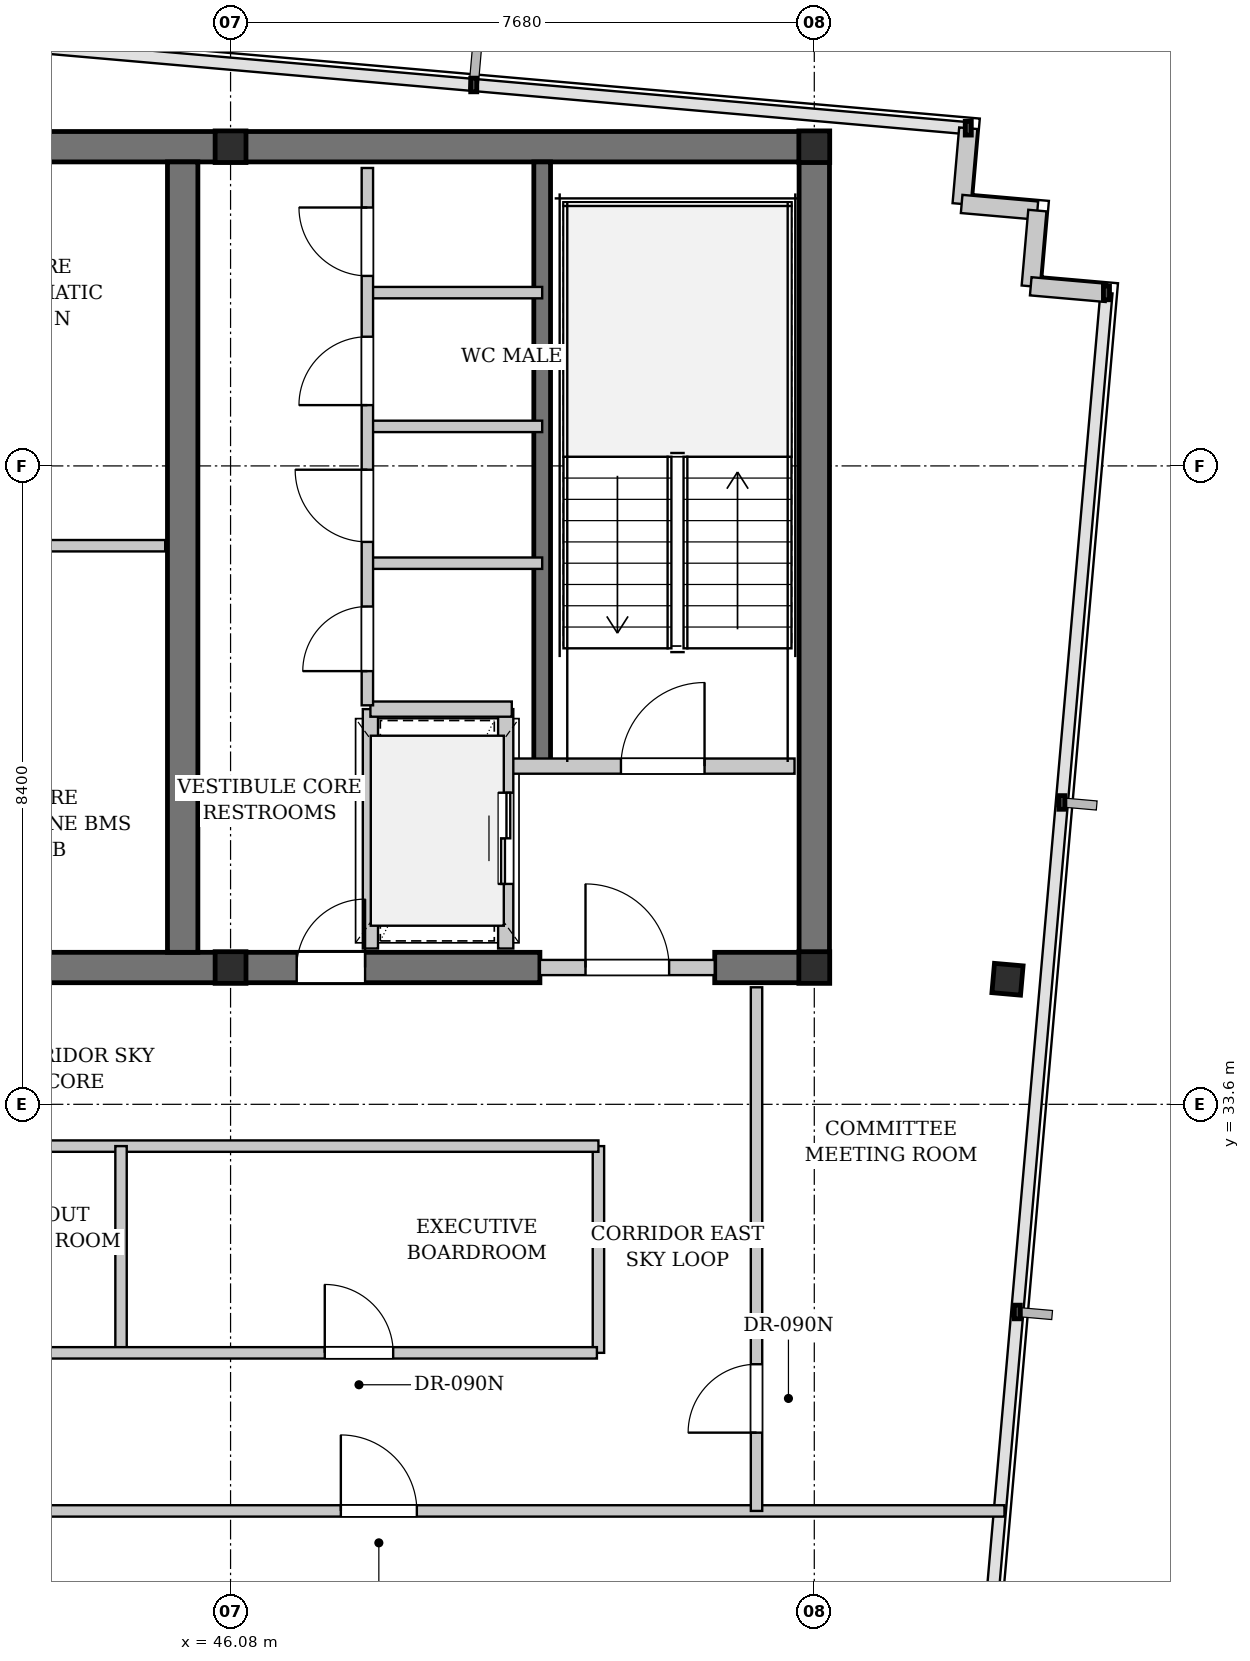
"""IFC4 building model, lengths in metres.
Left out: names, types, materials, properties, quantities, classifications, styles, units other than length and angle.
Written with IfcOpenShell. Run it as: python <this file> out.ifc"""

import sys

from ifc_helpers import new_model, si_unit, direction, frame, frame_2d, origin, origin_2d, place, context, subcontext, project, spatial, rectangle, i_section, extrude, element, fill, save


model = new_model("IFC4")
c1 = context("Model", 3, precision=1e-05, world=origin(), true_north=direction((0.0, 1.0)))
c2 = subcontext(c1, "Body", "Model", "MODEL_VIEW")
j1 = project(units=[si_unit("LENGTHUNIT", "METRE"), si_unit("PLANEANGLEUNIT", "RADIAN")], contexts=[c1])
p1 = place(None, origin())
s1 = spatial("IfcSite", under=j1, at=p1, CompositionType="ELEMENT")
p2 = place(p1, origin())
s2 = spatial("IfcBuilding", under=s1, at=p2, CompositionType="ELEMENT")
p3 = place(p2, frame((0.0, 0.0, 265.9)))
s3 = spatial("IfcBuildingStorey", under=s2, at=p3, CompositionType="ELEMENT", Elevation=265.9)
p4 = place(p3, frame((22.84, 46.2, 0.0), z_axis=(0.0, 0.0, 1.0), x_axis=(1.0, 0.0, 0.0)))
e1 = element("IfcWall", 1, at=p4, inside=s3, PredefinedType="SHEAR", context=c2, shape_type="SweptSolid", body=[
    extrude(rectangle(XDim=31.12, YDim=0.4, at=frame_2d((15.56, 0.0))), origin(), (0.0, 0.0, 1.0), 3.18),
])
p5 = place(p3, frame((42.1, 35.4, 0.0), z_axis=(0.0, 0.0, 1.0), x_axis=(1.0, 0.0, 0.0)))
e2 = element("IfcWall", 2, at=p5, inside=s3, PredefinedType="SHEAR", context=c2, shape_type="SweptSolid", body=[
    extrude(rectangle(XDim=8.05, YDim=0.4, at=frame_2d((4.025, 0.0))), origin(), (0.0, 0.0, 1.0), 3.18),
])
p6 = place(p5, frame((4.85, 0.0, 0.0)))
e3 = element("IfcOpeningElement", 3, at=p6, cuts=e2, PredefinedType="OPENING", context=c2, shape_type="SweptSolid", body=[
    extrude(rectangle(XDim=0.9, YDim=2.15, at=frame_2d((0.45, 1.075))), frame((0.0, 0.21, 0.0), z_axis=(0.0, -1.0, 0.0), x_axis=(1.0, 0.0, 0.0)), (0.0, 0.0, 1.0), 0.42),
])
p7 = place(p3, frame((52.45, 35.4, 0.0), z_axis=(0.0, 0.0, 1.0), x_axis=(1.0, 0.0, 0.0)))
e4 = element("IfcWall", 4, at=p7, inside=s3, PredefinedType="SHEAR", context=c2, shape_type="SweptSolid", body=[
    extrude(rectangle(XDim=1.51, YDim=0.4, at=frame_2d((0.755, 0.0))), origin(), (0.0, 0.0, 1.0), 3.18),
])
for number, where, z_axis, x_axis in (
    (5, (45.45, 35.6, 0.0), (0.0, 0.0, 1.0), (0.0, 1.0, 0.0)),
    (6, (53.76, 35.6, 0.0), (0.0, 0.0, 1.0), (0.0, 1.0, 0.0)),
):
    element("IfcWall", number, at=place(p3, frame(where, z_axis=z_axis, x_axis=x_axis)), inside=s3, PredefinedType="SHEAR", context=c2, shape_type="SweptSolid", body=[
        extrude(rectangle(XDim=10.4, YDim=0.4, at=frame_2d((5.2, 0.0))), origin(), (0.0, 0.0, 1.0), 3.18),
    ])
p8 = place(p3, frame((50.18, 38.05, 0.0), z_axis=(0.0, 0.0, 1.0), x_axis=(0.0, 1.0, 0.0)))
e7 = element("IfcWall", 7, at=p8, inside=s3, PredefinedType="SHEAR", context=c2, shape_type="SweptSolid", body=[
    extrude(rectangle(XDim=7.95, YDim=0.22, at=frame_2d((3.975, 0.0))), origin(), (0.0, 0.0, 1.0), 3.18),
])
for number, where, z_axis, x_axis in (
    (8, (46.08, 35.4, 0.0), (0.0, 0.0, 1.0), (1.0, 0.0, 0.0)),
    (9, (46.08, 46.2, 0.0), (0.0, 0.0, 1.0), (1.0, 0.0, 0.0)),
    (10, (53.76, 35.4, 0.0), (0.0, 0.0, 1.0), (1.0, 0.0, 0.0)),
    (11, (53.76, 46.2, 0.0), (0.0, 0.0, 1.0), (1.0, 0.0, 0.0)),
):
    element("IfcColumn", number, at=place(p3, frame(where, z_axis=z_axis, x_axis=x_axis)), inside=s3, PredefinedType="COLUMN", context=c2, shape_type="SweptSolid", body=[
        extrude(i_section(OverallWidth=0.406, OverallDepth=0.416, WebThickness=0.03, FlangeThickness=0.048, FilletRadius=0.015, at=origin_2d()), origin(), (0.0, 0.0, 1.0), 3.4),
    ])
p9 = place(p3, frame((56.302, 35.246, 0.0), z_axis=(0.0, 0.0, 1.0), x_axis=(0.996194698092, -0.087155742748, 0.0)))
e12 = element("IfcColumn", 12, at=p9, inside=s3, PredefinedType="COLUMN", context=c2, shape_type="SweptSolid", body=[
    extrude(i_section(OverallWidth=0.378, OverallDepth=0.387, WebThickness=0.021, FlangeThickness=0.033, FilletRadius=0.015, at=origin_2d()), origin(), (0.0, 0.0, 1.0), 3.4),
])
for number, where, z_axis, x_axis in (
    (13, (55.786, 46.443, 0.0), (0.0, 0.0, 1.0), (-0.087, -0.996, 0.0)),
    (14, (55.699, 45.447, 0.0), (0.0, 0.0, 1.0), (0.996, -0.087, 0.0)),
    (15, (56.695, 45.36, 0.0), (0.0, 0.0, 1.0), (-0.087, -0.996, 0.0)),
    (16, (56.608, 44.364, 0.0), (0.0, 0.0, 1.0), (0.996, -0.087, 0.0)),
):
    element("IfcWall", number, at=place(p3, frame(where, z_axis=z_axis, x_axis=x_axis)), inside=s3, PredefinedType="SOLIDWALL", context=c2, shape_type="SweptSolid", body=[
        extrude(rectangle(XDim=1.0, YDim=0.24, at=frame_2d((0.5, 0.0))), origin(), (0.0, 0.0, 1.0), 3.18),
    ])
p10 = place(p3, frame((41.85, 40.95, 0.0), z_axis=(0.0, 0.0, 1.0), x_axis=(1.0, 0.0, 0.0)))
e17 = element("IfcWall", 17, at=p10, inside=s3, PredefinedType="PARTITIONING", context=c2, shape_type="SweptSolid", body=[
    extrude(rectangle(XDim=3.37, YDim=0.15, at=frame_2d((1.685, 0.0))), origin(), (0.0, 0.0, 1.0), 3.18),
])
p11 = place(p3, frame((49.78, 38.05, 0.0), z_axis=(0.0, 0.0, 1.0), x_axis=(1.0, 0.0, 0.0)))
e18 = element("IfcWall", 18, at=p11, inside=s3, PredefinedType="PARTITIONING", context=c2, shape_type="SweptSolid", body=[
    extrude(rectangle(XDim=3.72, YDim=0.2, at=frame_2d((1.86, 0.0))), origin(), (0.0, 0.0, 1.0), 3.18),
])
p12 = place(p11, frame((1.436, 0.0, 0.0)))
e19 = element("IfcOpeningElement", 19, at=p12, cuts=e18, PredefinedType="OPENING", context=c2, shape_type="SweptSolid", body=[
    extrude(rectangle(XDim=1.1, YDim=2.15, at=frame_2d((0.55, 1.075))), frame((0.0, 0.11, 0.0), z_axis=(0.0, -1.0, 0.0), x_axis=(1.0, 0.0, 0.0)), (0.0, 0.0, 1.0), 0.22),
])
p13 = place(p3, frame((50.15, 35.4, 0.0), z_axis=(0.0, 0.0, 1.0), x_axis=(1.0, 0.0, 0.0)))
e20 = element("IfcWall", 20, at=p13, inside=s3, PredefinedType="PARTITIONING", context=c2, shape_type="SweptSolid", body=[
    extrude(rectangle(XDim=2.3, YDim=0.2, at=frame_2d((1.15, 0.0))), origin(), (0.0, 0.0, 1.0), 2.575),
])
p14 = place(p13, frame((0.6, 0.0, 0.0)))
e21 = element("IfcOpeningElement", 21, at=p14, cuts=e20, PredefinedType="OPENING", context=c2, shape_type="SweptSolid", body=[
    extrude(rectangle(XDim=1.1, YDim=2.15, at=frame_2d((0.55, 1.075))), frame((0.0, 0.11, 0.0), z_axis=(0.0, -1.0, 0.0), x_axis=(1.0, 0.0, 0.0)), (0.0, 0.0, 1.0), 0.22),
])
p15 = place(p3, frame((49.7, 35.65, 0.0), z_axis=(0.0, 0.0, 1.0), x_axis=(0.0, 1.0, 0.0)))
e22 = element("IfcWall", 22, at=p15, inside=s3, PredefinedType="PARTITIONING", context=c2, shape_type="SweptSolid", body=[
    extrude(rectangle(XDim=3.15, YDim=0.2, at=frame_2d((1.575, 0.0))), origin(), (0.0, 0.0, 1.0), 3.18),
])
p16 = place(p15, frame((0.85, 0.0, 0.0)))
e23 = element("IfcOpeningElement", 23, at=p16, cuts=e22, PredefinedType="OPENING", context=c2, shape_type="SweptSolid", body=[
    extrude(rectangle(XDim=1.2, YDim=2.2, at=frame_2d((0.6, 1.1))), frame((0.0, 0.11, 0.0), z_axis=(0.0, -1.0, 0.0), x_axis=(1.0, 0.0, 0.0)), (0.0, 0.0, 1.0), 0.22),
])
p17 = place(p3, frame((47.92, 35.65, 0.0), z_axis=(0.0, 0.0, 1.0), x_axis=(0.0, 1.0, 0.0)))
e24 = element("IfcWall", 24, at=p17, inside=s3, PredefinedType="PARTITIONING", context=c2, shape_type="SweptSolid", body=[
    extrude(rectangle(XDim=3.15, YDim=0.2, at=frame_2d((1.575, 0.0))), origin(), (0.0, 0.0, 1.0), 3.18),
])
p18 = place(p3, frame((47.92, 38.8, 0.0), z_axis=(0.0, 0.0, 1.0), x_axis=(1.0, 0.0, 0.0)))
e25 = element("IfcWall", 25, at=p18, inside=s3, PredefinedType="PARTITIONING", context=c2, shape_type="SweptSolid", body=[
    extrude(rectangle(XDim=1.86, YDim=0.2, at=frame_2d((0.93, 0.0))), origin(), (0.0, 0.0, 1.0), 3.18),
])
for number, where, z_axis, x_axis in (
    (26, (47.88, 40.72, 0.0), (0.0, 0.0, 1.0), (1.0, 0.0, 0.0)),
    (27, (47.88, 42.52, 0.0), (0.0, 0.0, 1.0), (1.0, 0.0, 0.0)),
    (28, (47.88, 44.28, 0.0), (0.0, 0.0, 1.0), (1.0, 0.0, 0.0)),
):
    element("IfcWall", number, at=place(p3, frame(where, z_axis=z_axis, x_axis=x_axis)), inside=s3, PredefinedType="PARTITIONING", context=c2, shape_type="SweptSolid", body=[
        extrude(rectangle(XDim=2.3, YDim=0.15, at=frame_2d((1.15, 0.0))), origin(), (0.0, 0.0, 1.0), 3.18),
    ])
p19 = place(p3, frame((47.88, 38.85, 0.0), z_axis=(0.0, 0.0, 1.0), x_axis=(0.0, 1.0, 0.0)))
e29 = element("IfcWall", 29, at=p19, inside=s3, PredefinedType="PARTITIONING", context=c2, shape_type="SweptSolid", body=[
    extrude(rectangle(XDim=7.07, YDim=0.15, at=frame_2d((3.535, 0.0))), origin(), (0.0, 0.0, 1.0), 3.18),
])
p20 = place(p19, frame((0.45, 0.0, 0.0)))
e30 = element("IfcOpeningElement", 30, at=p20, cuts=e29, PredefinedType="OPENING", context=c2, shape_type="SweptSolid", body=[
    extrude(rectangle(XDim=0.85, YDim=2.15, at=frame_2d((0.425, 1.075))), frame((0.0, 0.085, 0.0), z_axis=(0.0, -1.0, 0.0), x_axis=(1.0, 0.0, 0.0)), (0.0, 0.0, 1.0), 0.17),
])
p21 = place(p19, frame((2.15, 0.0, 0.0)))
e31 = element("IfcOpeningElement", 31, at=p21, cuts=e29, PredefinedType="OPENING", context=c2, shape_type="SweptSolid", body=[
    extrude(rectangle(XDim=0.95, YDim=2.15, at=frame_2d((0.475, 1.075))), frame((0.0, 0.085, 0.0), z_axis=(0.0, -1.0, 0.0), x_axis=(1.0, 0.0, 0.0)), (0.0, 0.0, 1.0), 0.17),
])
p22 = place(p19, frame((3.95, 0.0, 0.0)))
e32 = element("IfcOpeningElement", 32, at=p22, cuts=e29, PredefinedType="OPENING", context=c2, shape_type="SweptSolid", body=[
    extrude(rectangle(XDim=0.9, YDim=2.15, at=frame_2d((0.45, 1.075))), frame((0.0, 0.085, 0.0), z_axis=(0.0, -1.0, 0.0), x_axis=(1.0, 0.0, 0.0)), (0.0, 0.0, 1.0), 0.17),
])
p23 = place(p19, frame((5.65, 0.0, 0.0)))
e33 = element("IfcOpeningElement", 33, at=p23, cuts=e29, PredefinedType="OPENING", context=c2, shape_type="SweptSolid", body=[
    extrude(rectangle(XDim=0.9, YDim=2.15, at=frame_2d((0.45, 1.075))), frame((0.0, 0.085, 0.0), z_axis=(0.0, -1.0, 0.0), x_axis=(1.0, 0.0, 0.0)), (0.0, 0.0, 1.0), 0.17),
])
p24 = place(p3, frame((35.62, 28.25, 0.0), z_axis=(0.0, 0.0, 1.0), x_axis=(1.0, 0.0, 0.0)))
e34 = element("IfcWall", 34, at=p24, inside=s3, PredefinedType="PARTITIONING", context=c2, shape_type="SweptSolid", body=[
    extrude(rectangle(XDim=20.642, YDim=0.15, at=frame_2d((10.321, 0.0))), origin(), (0.0, 0.0, 1.0), 3.18),
])
p25 = place(p24, frame((3.226, 0.0, 0.0)))
e35 = element("IfcOpeningElement", 35, at=p25, cuts=e34, PredefinedType="OPENING", context=c2, shape_type="SweptSolid", body=[
    extrude(rectangle(XDim=1.0, YDim=2.15, at=frame_2d((0.5, 1.075))), frame((0.0, 0.085, 0.0), z_axis=(0.0, -1.0, 0.0), x_axis=(1.0, 0.0, 0.0)), (0.0, 0.0, 1.0), 0.17),
])
p26 = place(p24, frame((11.911, 0.0, 0.0)))
e36 = element("IfcOpeningElement", 36, at=p26, cuts=e34, PredefinedType="OPENING", context=c2, shape_type="SweptSolid", body=[
    extrude(rectangle(XDim=1.0, YDim=2.15, at=frame_2d((0.5, 1.075))), frame((0.0, 0.085, 0.0), z_axis=(0.0, -1.0, 0.0), x_axis=(1.0, 0.0, 0.0)), (0.0, 0.0, 1.0), 0.17),
])
p27 = place(p3, frame((53.0, 28.25, 0.0), z_axis=(0.0, 0.0, 1.0), x_axis=(0.0, 1.0, 0.0)))
e37 = element("IfcWall", 37, at=p27, inside=s3, PredefinedType="PARTITIONING", context=c2, shape_type="SweptSolid", body=[
    extrude(rectangle(XDim=6.89, YDim=0.15, at=frame_2d((3.445, 0.0))), origin(), (0.0, 0.0, 1.0), 3.18),
])
p28 = place(p27, frame((1.03, 0.0, 0.0)))
e38 = element("IfcOpeningElement", 38, at=p28, cuts=e37, PredefinedType="OPENING", context=c2, shape_type="SweptSolid", body=[
    extrude(rectangle(XDim=0.9, YDim=2.15, at=frame_2d((0.45, 1.075))), frame((0.0, 0.085, 0.0), z_axis=(0.0, -1.0, 0.0), x_axis=(1.0, 0.0, 0.0)), (0.0, 0.0, 1.0), 0.17),
])
p29 = place(p3, frame((50.92, 30.33, 0.0), z_axis=(0.0, 0.0, 1.0), x_axis=(0.0, 1.0, 0.0)))
e39 = element("IfcWall", 39, at=p29, inside=s3, PredefinedType="PARTITIONING", context=c2, shape_type="SweptSolid", body=[
    extrude(rectangle(XDim=2.72, YDim=0.15, at=frame_2d((1.36, 0.0))), origin(), (0.0, 0.0, 1.0), 3.18),
])
p30 = place(p3, frame((35.62, 33.05, 0.0), z_axis=(0.0, 0.0, 1.0), x_axis=(1.0, 0.0, 0.0)))
e40 = element("IfcWall", 40, at=p30, inside=s3, PredefinedType="PARTITIONING", context=c2, shape_type="SweptSolid", body=[
    extrude(rectangle(XDim=15.3, YDim=0.15, at=frame_2d((7.65, 0.0))), origin(), (0.0, 0.0, 1.0), 3.18),
])
p31 = place(p3, frame((44.639, 30.33, 0.0), z_axis=(0.0, 0.0, 1.0), x_axis=(0.0, 1.0, 0.0)))
e41 = element("IfcWall", 41, at=p31, inside=s3, PredefinedType="PARTITIONING", context=c2, shape_type="SweptSolid", body=[
    extrude(rectangle(XDim=2.72, YDim=0.15, at=frame_2d((1.36, 0.0))), origin(), (0.0, 0.0, 1.0), 3.18),
])
p32 = place(p3, frame((35.63, 30.33, 0.0), z_axis=(0.0, 0.0, 1.0), x_axis=(1.0, 0.0, 0.0)))
e42 = element("IfcWall", 42, at=p32, inside=s3, PredefinedType="PARTITIONING", context=c2, shape_type="SweptSolid", body=[
    extrude(rectangle(XDim=15.27, YDim=0.15, at=frame_2d((7.635, 0.0))), origin(), (0.0, 0.0, 1.0), 3.18),
])
p33 = place(p32, frame((1.306, 0.0, 0.0)))
e43 = element("IfcOpeningElement", 43, at=p33, cuts=e42, PredefinedType="OPENING", context=c2, shape_type="SweptSolid", body=[
    extrude(rectangle(XDim=0.9, YDim=2.15, at=frame_2d((0.45, 1.075))), frame((0.0, 0.085, 0.0), z_axis=(0.0, -1.0, 0.0), x_axis=(1.0, 0.0, 0.0)), (0.0, 0.0, 1.0), 0.17),
])
p34 = place(p32, frame((5.811, 0.0, 0.0)))
e44 = element("IfcOpeningElement", 44, at=p34, cuts=e42, PredefinedType="OPENING", context=c2, shape_type="SweptSolid", body=[
    extrude(rectangle(XDim=0.9, YDim=2.15, at=frame_2d((0.45, 1.075))), frame((0.0, 0.085, 0.0), z_axis=(0.0, -1.0, 0.0), x_axis=(1.0, 0.0, 0.0)), (0.0, 0.0, 1.0), 0.17),
])
p35 = place(p32, frame((11.689, 0.0, 0.0)))
e45 = element("IfcOpeningElement", 45, at=p35, cuts=e42, PredefinedType="OPENING", context=c2, shape_type="SweptSolid", body=[
    extrude(rectangle(XDim=0.9, YDim=2.15, at=frame_2d((0.45, 1.075))), frame((0.0, 0.085, 0.0), z_axis=(0.0, -1.0, 0.0), x_axis=(1.0, 0.0, 0.0)), (0.0, 0.0, 1.0), 0.17),
])
p36 = place(p12, origin())
e46 = element("IfcDoor", 46, at=p36, inside=s3, OperationType="SINGLE_SWING_RIGHT", PredefinedType="DOOR", context=c2, shape_type="SweptSolid", body=[
    extrude(rectangle(XDim=1.1, YDim=2.15, at=frame_2d((0.55, 1.075))), frame((0.0, 0.025, 0.0), z_axis=(0.0, -1.0, 0.0), x_axis=(1.0, 0.0, 0.0)), (0.0, 0.0, 1.0), 0.05),
])
fill(e19, e46)
p37 = place(p14, origin())
e47 = element("IfcDoor", 47, at=p37, inside=s3, OperationType="SINGLE_SWING_LEFT", PredefinedType="DOOR", context=c2, shape_type="SweptSolid", body=[
    extrude(rectangle(XDim=1.1, YDim=2.15, at=frame_2d((0.55, 1.075))), frame((0.0, 0.025, 0.0), z_axis=(0.0, -1.0, 0.0), x_axis=(1.0, 0.0, 0.0)), (0.0, 0.0, 1.0), 0.05),
])
fill(e21, e47)
p38 = place(p16, origin())
e48 = element("IfcDoor", 48, at=p38, inside=s3, OperationType="DOUBLE_DOOR_SLIDING", PredefinedType="DOOR", context=c2, shape_type="SweptSolid", body=[
    extrude(rectangle(XDim=1.2, YDim=2.2, at=frame_2d((0.6, 1.1))), frame((0.0, 0.025, 0.0), z_axis=(0.0, -1.0, 0.0), x_axis=(1.0, 0.0, 0.0)), (0.0, 0.0, 1.0), 0.05),
])
fill(e23, e48)
p39 = place(p20, origin())
e49 = element("IfcDoor", 49, at=p39, inside=s3, OperationType="SINGLE_SWING_LEFT", PredefinedType="DOOR", context=c2, shape_type="SweptSolid", body=[
    extrude(rectangle(XDim=0.85, YDim=2.15, at=frame_2d((0.425, 1.075))), frame((0.0, 0.025, 0.0), z_axis=(0.0, -1.0, 0.0), x_axis=(1.0, 0.0, 0.0)), (0.0, 0.0, 1.0), 0.05),
])
fill(e30, e49)
p40 = place(p21, origin())
e50 = element("IfcDoor", 50, at=p40, inside=s3, OperationType="SINGLE_SWING_RIGHT", PredefinedType="DOOR", context=c2, shape_type="SweptSolid", body=[
    extrude(rectangle(XDim=0.95, YDim=2.15, at=frame_2d((0.475, 1.075))), frame((0.0, 0.025, 0.0), z_axis=(0.0, -1.0, 0.0), x_axis=(1.0, 0.0, 0.0)), (0.0, 0.0, 1.0), 0.05),
])
fill(e31, e50)
p41 = place(p22, origin())
e51 = element("IfcDoor", 51, at=p41, inside=s3, OperationType="SINGLE_SWING_LEFT", PredefinedType="DOOR", context=c2, shape_type="SweptSolid", body=[
    extrude(rectangle(XDim=0.9, YDim=2.15, at=frame_2d((0.45, 1.075))), frame((0.0, 0.025, 0.0), z_axis=(0.0, -1.0, 0.0), x_axis=(1.0, 0.0, 0.0)), (0.0, 0.0, 1.0), 0.05),
])
fill(e32, e51)
p42 = place(p23, origin())
e52 = element("IfcDoor", 52, at=p42, inside=s3, OperationType="SINGLE_SWING_RIGHT", PredefinedType="DOOR", context=c2, shape_type="SweptSolid", body=[
    extrude(rectangle(XDim=0.9, YDim=2.15, at=frame_2d((0.45, 1.075))), frame((0.0, 0.025, 0.0), z_axis=(0.0, -1.0, 0.0), x_axis=(1.0, 0.0, 0.0)), (0.0, 0.0, 1.0), 0.05),
])
fill(e33, e52)
p43 = place(p26, origin())
e53 = element("IfcDoor", 53, at=p43, inside=s3, OperationType="SINGLE_SWING_LEFT", PredefinedType="DOOR", context=c2, shape_type="SweptSolid", body=[
    extrude(rectangle(XDim=1.0, YDim=2.15, at=frame_2d((0.5, 1.075))), frame((0.0, 0.025, 0.0), z_axis=(0.0, -1.0, 0.0), x_axis=(1.0, 0.0, 0.0)), (0.0, 0.0, 1.0), 0.05),
])
fill(e36, e53)
p44 = place(p28, origin())
e54 = element("IfcDoor", 54, at=p44, inside=s3, OperationType="SINGLE_SWING_LEFT", PredefinedType="DOOR", context=c2, shape_type="SweptSolid", body=[
    extrude(rectangle(XDim=0.9, YDim=2.15, at=frame_2d((0.45, 1.075))), frame((0.0, 0.025, 0.0), z_axis=(0.0, -1.0, 0.0), x_axis=(1.0, 0.0, 0.0)), (0.0, 0.0, 1.0), 0.05),
])
fill(e38, e54)
p45 = place(p35, origin())
e55 = element("IfcDoor", 55, at=p45, inside=s3, OperationType="SINGLE_SWING_LEFT", PredefinedType="DOOR", context=c2, shape_type="SweptSolid", body=[
    extrude(rectangle(XDim=0.9, YDim=2.15, at=frame_2d((0.45, 1.075))), frame((0.0, 0.025, 0.0), z_axis=(0.0, -1.0, 0.0), x_axis=(1.0, 0.0, 0.0)), (0.0, 0.0, 1.0), 0.05),
])
fill(e45, e55)
p46 = place(p6, origin())
e56 = element("IfcDoor", 56, at=p46, inside=s3, OperationType="SINGLE_SWING_RIGHT", PredefinedType="DOOR", context=c2, shape_type="SweptSolid", body=[
    extrude(rectangle(XDim=0.9, YDim=2.15, at=frame_2d((0.45, 1.075))), frame((0.0, 0.025, 0.0), z_axis=(0.0, -1.0, 0.0), x_axis=(1.0, 0.0, 0.0)), (0.0, 0.0, 1.0), 0.05),
])
fill(e3, e56)
save(model, sys.argv[1])
